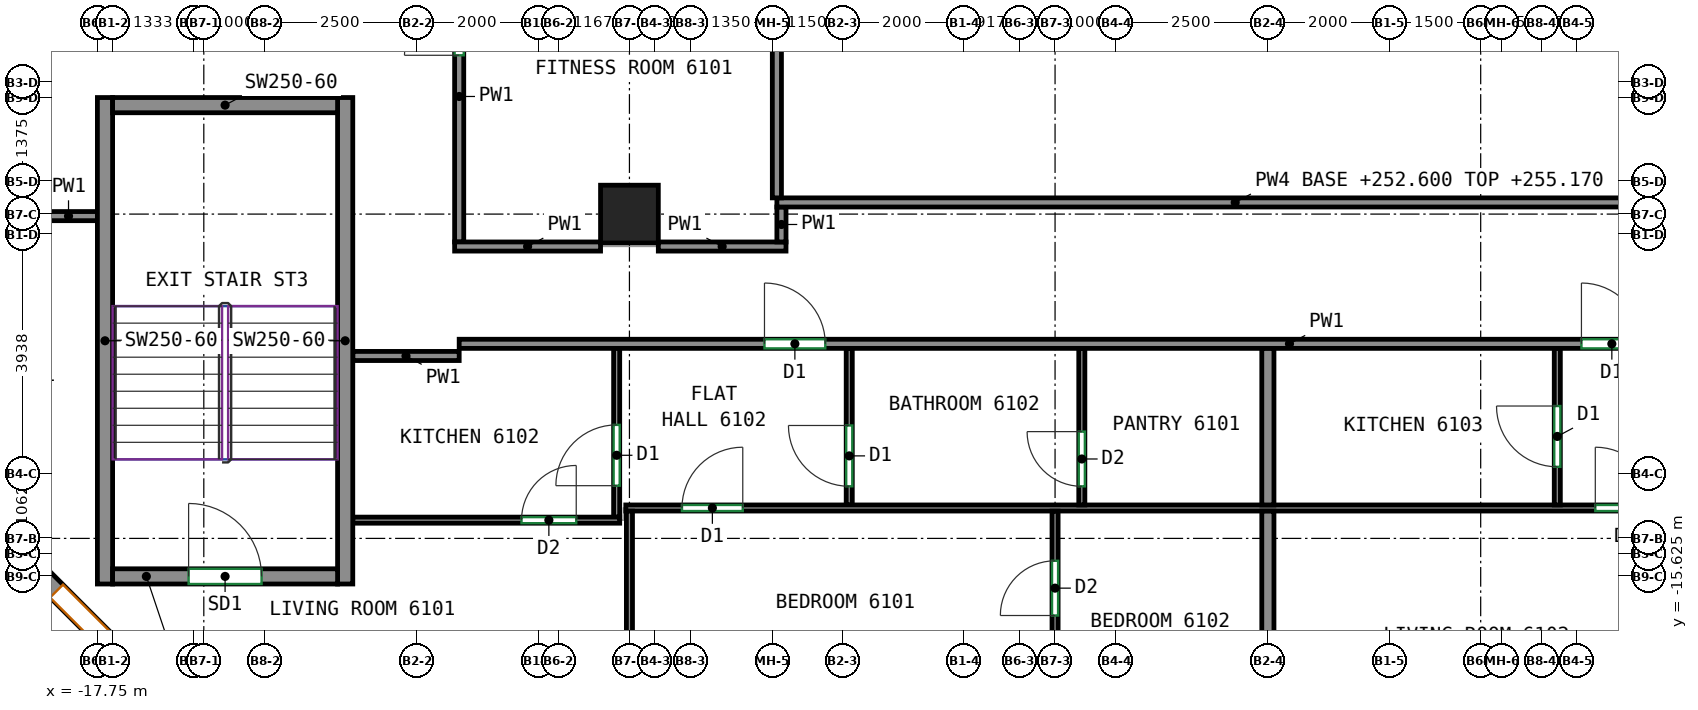
"""IFC4 building model, lengths in metres.
Left out: names, types, materials, properties, quantities, classifications, styles, units other than length and angle.
Written with IfcOpenShell. Run it as: python <this file> out.ifc"""

import sys

from ifc_helpers import new_model, si_unit, direction, frame, frame_2d, origin, origin_2d, place, context, subcontext, project, spatial, rectangle, extrude, source, transform, mapped, element, fill, save


model = new_model("IFC4")
c1 = context("Model", 3, precision=1e-05, world=origin(), true_north=direction((0.0, 1.0)))
c2 = subcontext(c1, "Body", "Model", "MODEL_VIEW")
j1 = project(units=[si_unit("LENGTHUNIT", "METRE"), si_unit("PLANEANGLEUNIT", "RADIAN")], contexts=[c1])
p1 = place(None, origin())
s1 = spatial("IfcSite", under=j1, at=p1, CompositionType="ELEMENT")
p2 = place(p1, origin())
s2 = spatial("IfcBuilding", under=s1, at=p2, CompositionType="ELEMENT")
p3 = place(p2, frame((0.0, 0.0, 252.6)))
s3 = spatial("IfcBuildingStorey", under=s2, at=p3, CompositionType="ELEMENT", Elevation=252.6)
m1 = source(origin(), c2, "Body", "SweptSolid", [
    extrude(rectangle(XDim=0.95, YDim=0.95, at=origin_2d()), origin(), (0.0, 0.0, 1.0), 3.12),
])
p4 = place(p3, frame((-9.0, -9.667, 0.0), z_axis=(0.0, 0.0, 1.0), x_axis=(1.0, 0.0, 0.0)))
e1 = element("IfcColumn", 1, at=p4, inside=s3, PredefinedType="COLUMN", context=c2, shape_type="MappedRepresentation", body=[
    mapped(m1, transform((0.0, 0.0, 0.0))),
])
m2 = source(origin(), c2, "Body", "SweptSolid", [
    extrude(rectangle(XDim=8.0, YDim=0.25, at=frame_2d((4.0, 0.0))), origin(), (0.0, 0.0, 1.0), 3.12),
])
for number, where, z_axis, x_axis in (
    (2, (-17.625, -15.75, 0.0), (0.0, 0.0, 1.0), (0.0, 1.0, 0.0)),
    (3, (-13.675, -15.75, 0.0), (0.0, 0.0, 1.0), (0.0, 1.0, 0.0)),
):
    element("IfcWall", number, at=place(p3, frame(where, z_axis=z_axis, x_axis=x_axis)), inside=s3, PredefinedType="SHEAR", context=c2, shape_type="MappedRepresentation", body=[
        mapped(m2, transform((0.0, 0.0, 0.0))),
    ])
m3 = source(origin(), c2, "Body", "SweptSolid", [
    extrude(rectangle(XDim=3.7, YDim=0.25, at=frame_2d((1.85, 0.0))), origin(), (0.0, 0.0, 1.0), 3.12),
])
p5 = place(p3, frame((-17.5, -15.625, 0.0), z_axis=(0.0, 0.0, 1.0), x_axis=(1.0, 0.0, 0.0)))
e4 = element("IfcWall", 4, at=p5, inside=s3, PredefinedType="SHEAR", context=c2, shape_type="MappedRepresentation", body=[
    mapped(m3, transform((0.0, 0.0, 0.0))),
])
p6 = place(p5, frame((1.25, 0.0, 0.0)))
e5 = element("IfcOpeningElement", 5, at=p6, cuts=e4, PredefinedType="OPENING", context=c2, shape_type="SweptSolid", body=[
    extrude(rectangle(XDim=1.2, YDim=2.1, at=frame_2d((0.6, 1.05))), frame((0.0, 0.135, 0.0), z_axis=(0.0, -1.0, 0.0), x_axis=(1.0, 0.0, 0.0)), (0.0, 0.0, 1.0), 0.27),
])
p7 = place(p3, frame((-17.5, -7.875, 0.0), z_axis=(0.0, 0.0, 1.0), x_axis=(1.0, 0.0, 0.0)))
e6 = element("IfcWall", 6, at=p7, inside=s3, PredefinedType="SHEAR", context=c2, shape_type="MappedRepresentation", body=[
    mapped(m3, transform((0.0, 0.0, 0.0))),
])
m4 = source(origin(), c2, "Body", "SweptSolid", [
    extrude(rectangle(XDim=3.323, YDim=0.3, at=frame_2d((1.662, 0.0))), origin(), (0.0, 0.0, 1.0), 3.12),
])
p8 = place(p3, frame((-18.819, -15.469, 0.0), z_axis=(0.0, 0.0, 1.0), x_axis=(0.707070049321, -0.707143511144, 0.0)))
e7 = element("IfcWall", 7, at=p8, inside=s3, PredefinedType="SOLIDWALL", context=c2, shape_type="MappedRepresentation", body=[
    mapped(m4, transform((0.0, 0.0, 0.0))),
])
p9 = place(p8, frame((0.562, 0.0, 0.8)))
e8 = element("IfcOpeningElement", 8, at=p9, cuts=e7, PredefinedType="OPENING", context=c2, shape_type="SweptSolid", body=[
    extrude(rectangle(XDim=2.2, YDim=2.05, at=frame_2d((1.1, 1.025))), frame((0.0, 0.16, 0.0), z_axis=(0.0, -1.0, 0.0), x_axis=(1.0, 0.0, 0.0)), (0.0, 0.0, 1.0), 0.32),
])
p10 = place(p3, frame((-11.8, -11.8, 0.0), z_axis=(0.0, 0.0, 1.0), x_axis=(1.0, 0.0, 0.0)))
e9 = element("IfcWall", 9, at=p10, inside=s3, PredefinedType="PARTITIONING", context=c2, shape_type="SweptSolid", body=[
    extrude(rectangle(XDim=27.31, YDim=0.15, at=frame_2d((13.655, 0.0))), origin(), (0.0, 0.0, 1.0), 3.12),
])
p11 = place(p10, frame((5.021, 0.0, 0.0)))
e10 = element("IfcOpeningElement", 10, at=p11, cuts=e9, PredefinedType="OPENING", context=c2, shape_type="SweptSolid", body=[
    extrude(rectangle(XDim=1.0, YDim=2.1, at=frame_2d((0.5, 1.05))), frame((0.0, 0.085, 0.0), z_axis=(0.0, -1.0, 0.0), x_axis=(1.0, 0.0, 0.0)), (0.0, 0.0, 1.0), 0.17),
])
p12 = place(p10, frame((18.457, 0.0, 0.0)))
e11 = element("IfcOpeningElement", 11, at=p12, cuts=e9, PredefinedType="OPENING", context=c2, shape_type="SweptSolid", body=[
    extrude(rectangle(XDim=1.0, YDim=2.1, at=frame_2d((0.5, 1.05))), frame((0.0, 0.085, 0.0), z_axis=(0.0, -1.0, 0.0), x_axis=(1.0, 0.0, 0.0)), (0.0, 0.0, 1.0), 0.17),
])
p13 = place(p3, frame((-13.55, -12.0, 0.0), z_axis=(0.0, 0.0, 1.0), x_axis=(1.0, 0.0, 0.0)))
e12 = element("IfcWall", 12, at=p13, inside=s3, PredefinedType="PARTITIONING", context=c2, shape_type="SweptSolid", body=[
    extrude(rectangle(XDim=1.75, YDim=0.15, at=frame_2d((0.875, 0.0))), origin(), (0.0, 0.0, 1.0), 3.12),
])
p14 = place(p3, frame((-18.7, -9.7, 0.0), z_axis=(0.0, 0.0, 1.0), x_axis=(1.0, 0.0, 0.0)))
e13 = element("IfcWall", 13, at=p14, inside=s3, PredefinedType="PARTITIONING", context=c2, shape_type="SweptSolid", body=[
    extrude(rectangle(XDim=0.95, YDim=0.15, at=frame_2d((0.475, 0.0))), origin(), (0.0, 0.0, 1.0), 3.12),
])
p15 = place(p3, frame((-11.8, -10.125, 0.0), z_axis=(0.0, 0.0, 1.0), x_axis=(0.0, 1.0, 0.0)))
e14 = element("IfcWall", 14, at=p15, inside=s3, PredefinedType="PARTITIONING", context=c2, shape_type="SweptSolid", body=[
    extrude(rectangle(XDim=4.785, YDim=0.15, at=frame_2d((2.393, 0.0))), origin(), (0.0, 0.0, 1.0), 3.12),
])
p16 = place(p15, frame((3.07, 0.0, 0.0)))
e15 = element("IfcOpeningElement", 15, at=p16, cuts=e14, PredefinedType="OPENING", context=c2, shape_type="SweptSolid", body=[
    extrude(rectangle(XDim=0.9, YDim=2.1, at=frame_2d((0.45, 1.05))), frame((0.0, 0.085, 0.0), z_axis=(0.0, -1.0, 0.0), x_axis=(1.0, 0.0, 0.0)), (0.0, 0.0, 1.0), 0.17),
])
p17 = place(p3, frame((-8.525, -10.2, 0.0), z_axis=(0.0, 0.0, 1.0), x_axis=(1.0, 0.0, 0.0)))
e16 = element("IfcWall", 16, at=p17, inside=s3, PredefinedType="PARTITIONING", context=c2, shape_type="SweptSolid", body=[
    extrude(rectangle(XDim=2.1, YDim=0.15, at=frame_2d((1.05, 0.0))), origin(), (0.0, 0.0, 1.0), 3.12),
])
p18 = place(p3, frame((-11.875, -10.2, 0.0), z_axis=(0.0, 0.0, 1.0), x_axis=(1.0, 0.0, 0.0)))
e17 = element("IfcWall", 17, at=p18, inside=s3, PredefinedType="PARTITIONING", context=c2, shape_type="SweptSolid", body=[
    extrude(rectangle(XDim=2.4, YDim=0.15, at=frame_2d((1.2, 0.0))), origin(), (0.0, 0.0, 1.0), 3.12),
])
p19 = place(p3, frame((-6.5, -9.55, 0.0), z_axis=(0.0, 0.0, 1.0), x_axis=(0.0, -1.0, 0.0)))
e18 = element("IfcWall", 18, at=p19, inside=s3, PredefinedType="PARTITIONING", context=c2, shape_type="SweptSolid", body=[
    extrude(rectangle(XDim=0.575, YDim=0.15, at=frame_2d((0.288, 0.0))), origin(), (0.0, 0.0, 1.0), 3.12),
])
p20 = place(p3, frame((-9.21, -14.65, 0.0), z_axis=(0.0, 0.0, 1.0), x_axis=(0.0, 1.0, 0.0)))
e19 = element("IfcWall", 19, at=p20, inside=s3, PredefinedType="PARTITIONING", context=c2, shape_type="SweptSolid", body=[
    extrude(rectangle(XDim=2.773, YDim=0.1, at=frame_2d((1.386, 0.0))), origin(), (0.0, 0.0, 1.0), 3.12),
])
p21 = place(p20, frame((0.517, 0.0, 0.0)))
e20 = element("IfcOpeningElement", 20, at=p21, cuts=e19, PredefinedType="OPENING", context=c2, shape_type="SweptSolid", body=[
    extrude(rectangle(XDim=1.0, YDim=2.1, at=frame_2d((0.5, 1.05))), frame((0.0, 0.06, 0.0), z_axis=(0.0, -1.0, 0.0), x_axis=(1.0, 0.0, 0.0)), (0.0, 0.0, 1.0), 0.12),
])
p22 = place(p3, frame((-13.55, -14.7, 0.0), z_axis=(0.0, 0.0, 1.0), x_axis=(1.0, 0.0, 0.0)))
e21 = element("IfcWall", 21, at=p22, inside=s3, PredefinedType="PARTITIONING", context=c2, shape_type="SweptSolid", body=[
    extrude(rectangle(XDim=4.39, YDim=0.1, at=frame_2d((2.195, 0.0))), origin(), (0.0, 0.0, 1.0), 3.12),
])
p23 = place(p22, frame((2.775, 0.0, 0.0)))
e22 = element("IfcOpeningElement", 22, at=p23, cuts=e21, PredefinedType="OPENING", context=c2, shape_type="SweptSolid", body=[
    extrude(rectangle(XDim=0.9, YDim=2.1, at=frame_2d((0.45, 1.05))), frame((0.0, 0.06, 0.0), z_axis=(0.0, -1.0, 0.0), x_axis=(1.0, 0.0, 0.0)), (0.0, 0.0, 1.0), 0.12),
])
p24 = place(p3, frame((-5.385, -14.45, 0.0), z_axis=(0.0, 0.0, 1.0), x_axis=(0.0, 1.0, 0.0)))
e23 = element("IfcWall", 23, at=p24, inside=s3, PredefinedType="PARTITIONING", context=c2, shape_type="SweptSolid", body=[
    extrude(rectangle(XDim=2.573, YDim=0.1, at=frame_2d((1.287, 0.0))), origin(), (0.0, 0.0, 1.0), 3.12),
])
p25 = place(p24, frame((0.307, 0.0, 0.0)))
e24 = element("IfcOpeningElement", 24, at=p25, cuts=e23, PredefinedType="OPENING", context=c2, shape_type="SweptSolid", body=[
    extrude(rectangle(XDim=1.0, YDim=2.1, at=frame_2d((0.5, 1.05))), frame((0.0, 0.06, 0.0), z_axis=(0.0, -1.0, 0.0), x_axis=(1.0, 0.0, 0.0)), (0.0, 0.0, 1.0), 0.12),
])
p26 = place(p3, frame((-9.06, -14.5, 0.0), z_axis=(0.0, 0.0, 1.0), x_axis=(1.0, 0.0, 0.0)))
e25 = element("IfcWall", 25, at=p26, inside=s3, PredefinedType="PARTITIONING", context=c2, shape_type="SweptSolid", body=[
    extrude(rectangle(XDim=24.66, YDim=0.1, at=frame_2d((12.33, 0.0))), origin(), (0.0, 0.0, 1.0), 3.12),
])
p27 = place(p26, frame((0.924, 0.0, 0.0)))
e26 = element("IfcOpeningElement", 26, at=p27, cuts=e25, PredefinedType="OPENING", context=c2, shape_type="SweptSolid", body=[
    extrude(rectangle(XDim=1.0, YDim=2.1, at=frame_2d((0.5, 1.05))), frame((0.0, 0.06, 0.0), z_axis=(0.0, -1.0, 0.0), x_axis=(1.0, 0.0, 0.0)), (0.0, 0.0, 1.0), 0.12),
])
p28 = place(p26, frame((15.945, 0.0, 0.0)))
e27 = element("IfcOpeningElement", 27, at=p28, cuts=e25, PredefinedType="OPENING", context=c2, shape_type="SweptSolid", body=[
    extrude(rectangle(XDim=1.0, YDim=2.1, at=frame_2d((0.5, 1.05))), frame((0.0, 0.06, 0.0), z_axis=(0.0, -1.0, 0.0), x_axis=(1.0, 0.0, 0.0)), (0.0, 0.0, 1.0), 0.12),
])
p29 = place(p26, frame((18.387, 0.0, 0.0)))
e28 = element("IfcOpeningElement", 28, at=p29, cuts=e25, PredefinedType="OPENING", context=c2, shape_type="SweptSolid", body=[
    extrude(rectangle(XDim=1.0, YDim=2.1, at=frame_2d((0.5, 1.05))), frame((0.0, 0.06, 0.0), z_axis=(0.0, -1.0, 0.0), x_axis=(1.0, 0.0, 0.0)), (0.0, 0.0, 1.0), 0.12),
])
p30 = place(p3, frame((-1.56, -14.45, 0.0), z_axis=(0.0, 0.0, 1.0), x_axis=(0.0, 1.0, 0.0)))
e29 = element("IfcWall", 29, at=p30, inside=s3, PredefinedType="PARTITIONING", context=c2, shape_type="SweptSolid", body=[
    extrude(rectangle(XDim=2.573, YDim=0.1, at=frame_2d((1.287, 0.0))), origin(), (0.0, 0.0, 1.0), 3.12),
])
p31 = place(p30, frame((0.306, 0.0, 0.0)))
e30 = element("IfcOpeningElement", 30, at=p31, cuts=e29, PredefinedType="OPENING", context=c2, shape_type="SweptSolid", body=[
    extrude(rectangle(XDim=0.9, YDim=2.1, at=frame_2d((0.45, 1.05))), frame((0.0, 0.06, 0.0), z_axis=(0.0, -1.0, 0.0), x_axis=(1.0, 0.0, 0.0)), (0.0, 0.0, 1.0), 0.12),
])
p32 = place(p3, frame((1.5, -14.45, 0.0), z_axis=(0.0, 0.0, 1.0), x_axis=(0.0, 1.0, 0.0)))
e31 = element("IfcWall", 31, at=p32, inside=s3, PredefinedType="PARTITIONING", context=c2, shape_type="SweptSolid", body=[
    extrude(rectangle(XDim=2.573, YDim=0.2, at=frame_2d((1.287, 0.0))), origin(), (0.0, 0.0, 1.0), 3.12),
])
p33 = place(p3, frame((-9.0, -17.7, 0.0), z_axis=(0.0, 0.0, 1.0), x_axis=(0.0, 1.0, 0.0)))
e32 = element("IfcWall", 32, at=p33, inside=s3, PredefinedType="PARTITIONING", context=c2, shape_type="SweptSolid", body=[
    extrude(rectangle(XDim=3.148, YDim=0.1, at=frame_2d((1.574, 0.0))), origin(), (0.0, 0.0, 1.0), 3.12),
])
p34 = place(p3, frame((-2.0, -17.7, 0.0), z_axis=(0.0, 0.0, 1.0), x_axis=(0.0, 1.0, 0.0)))
e33 = element("IfcWall", 33, at=p34, inside=s3, PredefinedType="PARTITIONING", context=c2, shape_type="SweptSolid", body=[
    extrude(rectangle(XDim=3.148, YDim=0.1, at=frame_2d((1.574, 0.0))), origin(), (0.0, 0.0, 1.0), 3.12),
])
p35 = place(p34, frame((1.432, 0.0, 0.0)))
e34 = element("IfcOpeningElement", 34, at=p35, cuts=e33, PredefinedType="OPENING", context=c2, shape_type="SweptSolid", body=[
    extrude(rectangle(XDim=0.9, YDim=2.1, at=frame_2d((0.45, 1.05))), frame((0.0, 0.06, 0.0), z_axis=(0.0, -1.0, 0.0), x_axis=(1.0, 0.0, 0.0)), (0.0, 0.0, 1.0), 0.12),
])
p36 = place(p3, frame((1.5, -18.25, 0.0), z_axis=(0.0, 0.0, 1.0), x_axis=(0.0, 1.0, 0.0)))
e35 = element("IfcWall", 35, at=p36, inside=s3, PredefinedType="PARTITIONING", context=c2, shape_type="SweptSolid", body=[
    extrude(rectangle(XDim=3.698, YDim=0.2, at=frame_2d((1.849, 0.0))), origin(), (0.0, 0.0, 1.0), 3.12),
])
p37 = place(p3, frame((6.26, -14.45, 0.0), z_axis=(0.0, 0.0, 1.0), x_axis=(0.0, 1.0, 0.0)))
e36 = element("IfcWall", 36, at=p37, inside=s3, PredefinedType="PARTITIONING", context=c2, shape_type="SweptSolid", body=[
    extrude(rectangle(XDim=2.573, YDim=0.1, at=frame_2d((1.287, 0.0))), origin(), (0.0, 0.0, 1.0), 3.12),
])
p38 = place(p37, frame((0.627, 0.0, 0.0)))
e37 = element("IfcOpeningElement", 37, at=p38, cuts=e36, PredefinedType="OPENING", context=c2, shape_type="SweptSolid", body=[
    extrude(rectangle(XDim=1.0, YDim=2.1, at=frame_2d((0.5, 1.05))), frame((0.0, 0.06, 0.0), z_axis=(0.0, -1.0, 0.0), x_axis=(1.0, 0.0, 0.0)), (0.0, 0.0, 1.0), 0.12),
])
p39 = place(p3, frame((8.5, -9.475, 0.0), z_axis=(0.0, 0.0, 1.0), x_axis=(-1.0, 0.0, 0.0)))
e38 = element("IfcWall", 38, at=p39, inside=s3, PredefinedType="PARTITIONING", context=c2, shape_type="SweptSolid", body=[
    extrude(rectangle(XDim=15.075, YDim=0.15, at=frame_2d((7.538, 0.0))), origin(), (0.0, 0.0, 1.0), 2.57),
])
p40 = place(p3, frame((-6.575, -9.4, 0.0), z_axis=(0.0, 0.0, 1.0), x_axis=(0.0, 1.0, 0.0)))
e39 = element("IfcWall", 39, at=p40, inside=s3, PredefinedType="PARTITIONING", context=c2, shape_type="SweptSolid", body=[
    extrude(rectangle(XDim=15.0, YDim=0.15, at=frame_2d((7.5, 0.0))), origin(), (0.0, 0.0, 1.0), 3.12),
])
p41 = place(p9, origin())
e40 = element("IfcWindow", 40, at=p41, inside=s3, PartitioningType="SINGLE_PANEL", PredefinedType="WINDOW", context=c2, shape_type="SweptSolid", body=[
    extrude(rectangle(XDim=2.2, YDim=2.05, at=frame_2d((1.1, 1.025))), frame((0.0, 0.03, 0.0), z_axis=(0.0, -1.0, 0.0), x_axis=(1.0, 0.0, 0.0)), (0.0, 0.0, 1.0), 0.06),
])
fill(e8, e40)
p42 = place(p6, origin())
e41 = element("IfcDoor", 41, at=p42, inside=s3, OperationType="DOUBLE_DOOR_SINGLE_SWING", PredefinedType="DOOR", context=c2, shape_type="SweptSolid", body=[
    extrude(rectangle(XDim=1.2, YDim=2.1, at=frame_2d((0.6, 1.05))), frame((0.0, 0.025, 0.0), z_axis=(0.0, -1.0, 0.0), x_axis=(1.0, 0.0, 0.0)), (0.0, 0.0, 1.0), 0.05),
])
fill(e5, e41)
p43 = place(p35, origin())
e42 = element("IfcDoor", 42, at=p43, inside=s3, OperationType="SINGLE_SWING_LEFT", PredefinedType="DOOR", context=c2, shape_type="SweptSolid", body=[
    extrude(rectangle(XDim=0.9, YDim=2.1, at=frame_2d((0.45, 1.05))), frame((0.0, 0.025, 0.0), z_axis=(0.0, -1.0, 0.0), x_axis=(1.0, 0.0, 0.0)), (0.0, 0.0, 1.0), 0.05),
])
fill(e34, e42)
p44 = place(p23, origin())
e43 = element("IfcDoor", 43, at=p44, inside=s3, OperationType="SINGLE_SWING_RIGHT", PredefinedType="DOOR", context=c2, shape_type="SweptSolid", body=[
    extrude(rectangle(XDim=0.9, YDim=2.1, at=frame_2d((0.45, 1.05))), frame((0.0, 0.025, 0.0), z_axis=(0.0, -1.0, 0.0), x_axis=(1.0, 0.0, 0.0)), (0.0, 0.0, 1.0), 0.05),
])
fill(e22, e43)
p45 = place(p27, origin())
e44 = element("IfcDoor", 44, at=p45, inside=s3, OperationType="SINGLE_SWING_RIGHT", PredefinedType="DOOR", context=c2, shape_type="SweptSolid", body=[
    extrude(rectangle(XDim=1.0, YDim=2.1, at=frame_2d((0.5, 1.05))), frame((0.0, 0.025, 0.0), z_axis=(0.0, -1.0, 0.0), x_axis=(1.0, 0.0, 0.0)), (0.0, 0.0, 1.0), 0.05),
])
fill(e26, e44)
p46 = place(p28, origin())
e45 = element("IfcDoor", 45, at=p46, inside=s3, OperationType="SINGLE_SWING_LEFT", PredefinedType="DOOR", context=c2, shape_type="SweptSolid", body=[
    extrude(rectangle(XDim=1.0, YDim=2.1, at=frame_2d((0.5, 1.05))), frame((0.0, 0.025, 0.0), z_axis=(0.0, -1.0, 0.0), x_axis=(1.0, 0.0, 0.0)), (0.0, 0.0, 1.0), 0.05),
])
fill(e27, e45)
p47 = place(p31, origin())
e46 = element("IfcDoor", 46, at=p47, inside=s3, OperationType="SINGLE_SWING_RIGHT", PredefinedType="DOOR", context=c2, shape_type="SweptSolid", body=[
    extrude(rectangle(XDim=0.9, YDim=2.1, at=frame_2d((0.45, 1.05))), frame((0.0, 0.025, 0.0), z_axis=(0.0, -1.0, 0.0), x_axis=(1.0, 0.0, 0.0)), (0.0, 0.0, 1.0), 0.05),
])
fill(e30, e46)
p48 = place(p25, origin())
e47 = element("IfcDoor", 47, at=p48, inside=s3, OperationType="SINGLE_SWING_RIGHT", PredefinedType="DOOR", context=c2, shape_type="SweptSolid", body=[
    extrude(rectangle(XDim=1.0, YDim=2.1, at=frame_2d((0.5, 1.05))), frame((0.0, 0.025, 0.0), z_axis=(0.0, -1.0, 0.0), x_axis=(1.0, 0.0, 0.0)), (0.0, 0.0, 1.0), 0.05),
])
fill(e24, e47)
p49 = place(p21, origin())
e48 = element("IfcDoor", 48, at=p49, inside=s3, OperationType="SINGLE_SWING_LEFT", PredefinedType="DOOR", context=c2, shape_type="SweptSolid", body=[
    extrude(rectangle(XDim=1.0, YDim=2.1, at=frame_2d((0.5, 1.05))), frame((0.0, 0.025, 0.0), z_axis=(0.0, -1.0, 0.0), x_axis=(1.0, 0.0, 0.0)), (0.0, 0.0, 1.0), 0.05),
])
fill(e20, e48)
p50 = place(p38, origin())
e49 = element("IfcDoor", 49, at=p50, inside=s3, OperationType="SINGLE_SWING_RIGHT", PredefinedType="DOOR", context=c2, shape_type="SweptSolid", body=[
    extrude(rectangle(XDim=1.0, YDim=2.1, at=frame_2d((0.5, 1.05))), frame((0.0, 0.025, 0.0), z_axis=(0.0, -1.0, 0.0), x_axis=(1.0, 0.0, 0.0)), (0.0, 0.0, 1.0), 0.05),
])
fill(e37, e49)
p51 = place(p11, origin())
e50 = element("IfcDoor", 50, at=p51, inside=s3, OperationType="SINGLE_SWING_LEFT", PredefinedType="DOOR", context=c2, shape_type="SweptSolid", body=[
    extrude(rectangle(XDim=1.0, YDim=2.1, at=frame_2d((0.5, 1.05))), frame((0.0, 0.025, 0.0), z_axis=(0.0, -1.0, 0.0), x_axis=(1.0, 0.0, 0.0)), (0.0, 0.0, 1.0), 0.05),
])
fill(e10, e50)
p52 = place(p12, origin())
e51 = element("IfcDoor", 51, at=p52, inside=s3, OperationType="SINGLE_SWING_LEFT", PredefinedType="DOOR", context=c2, shape_type="SweptSolid", body=[
    extrude(rectangle(XDim=1.0, YDim=2.1, at=frame_2d((0.5, 1.05))), frame((0.0, 0.025, 0.0), z_axis=(0.0, -1.0, 0.0), x_axis=(1.0, 0.0, 0.0)), (0.0, 0.0, 1.0), 0.05),
])
fill(e11, e51)
p53 = place(p16, origin())
e52 = element("IfcDoor", 52, at=p53, inside=s3, OperationType="SINGLE_SWING_LEFT", PredefinedType="DOOR", context=c2, shape_type="SweptSolid", body=[
    extrude(rectangle(XDim=0.9, YDim=2.1, at=frame_2d((0.45, 1.05))), frame((0.0, 0.025, 0.0), z_axis=(0.0, -1.0, 0.0), x_axis=(1.0, 0.0, 0.0)), (0.0, 0.0, 1.0), 0.05),
])
fill(e15, e52)
save(model, sys.argv[1])
